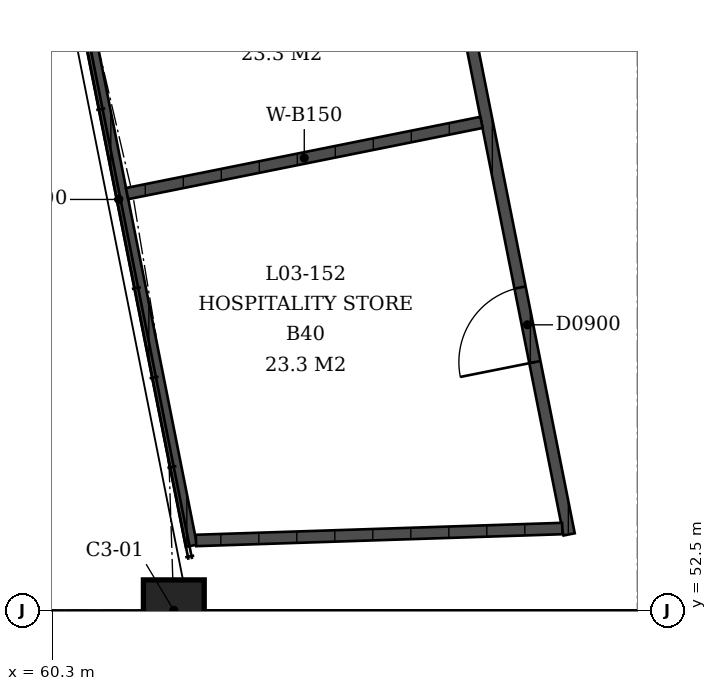
"""IFC4 building model, lengths in metres.
Left out: names, types, materials, properties, quantities, classifications, styles, units other than length and angle.
Written with IfcOpenShell. Run it as: python <this file> out.ifc"""

import sys

from ifc_helpers import new_model, si_unit, direction, frame, frame_2d, origin, origin_2d, place, context, subcontext, project, spatial, rectangle, extrude, element, fill, save


model = new_model("IFC4")
c1 = context("Model", 3, precision=1e-05, world=origin(), true_north=direction((0.0, 1.0)))
c2 = subcontext(c1, "Body", "Model", "MODEL_VIEW")
j1 = project(units=[si_unit("LENGTHUNIT", "METRE"), si_unit("PLANEANGLEUNIT", "RADIAN")], contexts=[c1])
p1 = place(None, origin())
s1 = spatial("IfcSite", under=j1, at=p1, CompositionType="ELEMENT")
p2 = place(p1, origin())
s2 = spatial("IfcBuilding", under=s1, at=p2, CompositionType="ELEMENT")
p3 = place(p2, frame((0.0, 0.0, 13.5)))
s3 = spatial("IfcBuildingStorey", under=s2, at=p3, CompositionType="ELEMENT", Elevation=13.5)
p4 = place(p3, frame((61.9, 52.5, 0.0), z_axis=(0.0, 0.0, 1.0), x_axis=(0.0, 1.0, 0.0)))
e1 = element("IfcColumn", 1, at=p4, inside=s3, PredefinedType="COLUMN", context=c2, shape_type="SweptSolid", body=[
    extrude(rectangle(XDim=0.8, YDim=0.8, at=origin_2d()), origin(), (0.0, 0.0, 1.0), 2.033),
])
p5 = place(p3, frame((60.235, 62.88, 0.0), z_axis=(0.0, 0.0, 1.0), x_axis=(0.19508210738, -0.98078691436, 0.0)))
e2 = element("IfcWall", 2, at=p5, inside=s3, PredefinedType="SOLIDWALL", context=c2, shape_type="SweptSolid", body=[
    extrude(rectangle(XDim=9.718, YDim=0.15, at=frame_2d((4.859, 0.0))), origin(), (0.0, 0.0, 1.0), 3.0),
])
p6 = place(p3, frame((64.939, 64.369, 0.0), z_axis=(0.0, 0.0, 1.0), x_axis=(0.195090821685, -0.980785181013, 0.0)))
e3 = element("IfcWall", 3, at=p6, inside=s3, PredefinedType="SOLIDWALL", context=c2, shape_type="SweptSolid", body=[
    extrude(rectangle(XDim=11.083, YDim=0.15, at=frame_2d((5.541, 0.0))), origin(), (0.0, 0.0, 1.0), 3.0),
])
p7 = place(p6, frame((2.311, 0.0, 0.0)))
e4 = element("IfcOpeningElement", 4, at=p7, cuts=e3, PredefinedType="OPENING", context=c2, shape_type="SweptSolid", body=[
    extrude(rectangle(XDim=1.0, YDim=2.1, at=frame_2d((0.5, 1.05))), frame((0.0, 0.075, 0.0), z_axis=(0.0, -1.0, 0.0), x_axis=(1.0, 0.0, 0.0)), (0.0, 0.0, 1.0), 0.15),
])
p8 = place(p6, frame((7.771, 0.0, 0.0)))
e5 = element("IfcOpeningElement", 5, at=p8, cuts=e3, PredefinedType="OPENING", context=c2, shape_type="SweptSolid", body=[
    extrude(rectangle(XDim=1.0, YDim=2.1, at=frame_2d((0.5, 1.05))), frame((0.0, 0.075, 0.0), z_axis=(0.0, -1.0, 0.0), x_axis=(1.0, 0.0, 0.0)), (0.0, 0.0, 1.0), 0.15),
])
p9 = place(p3, frame((61.284, 57.982, 0.0), z_axis=(0.0, 0.0, 1.0), x_axis=(0.980408567663, 0.196974720342, 0.0)))
e6 = element("IfcWall", 6, at=p9, inside=s3, PredefinedType="SOLIDWALL", context=c2, shape_type="SweptSolid", body=[
    extrude(rectangle(XDim=4.757, YDim=0.15, at=frame_2d((2.378, 0.0))), origin(), (0.0, 0.0, 1.0), 3.0),
])
p10 = place(p3, frame((62.192, 53.419, 0.0), z_axis=(0.0, 0.0, 1.0), x_axis=(0.999469799468, 0.032559483284, 0.0)))
e7 = element("IfcWall", 7, at=p10, inside=s3, PredefinedType="SOLIDWALL", context=c2, shape_type="SweptSolid", body=[
    extrude(rectangle(XDim=4.821, YDim=0.15, at=frame_2d((2.411, 0.0))), origin(), (0.0, 0.0, 1.0), 3.0),
])
p11 = place(p8, origin())
e8 = element("IfcDoor", 8, at=p11, inside=s3, OperationType="SINGLE_SWING_RIGHT", PredefinedType="DOOR", context=c2, shape_type="SweptSolid", body=[
    extrude(rectangle(XDim=1.0, YDim=2.1, at=frame_2d((0.5, 1.05))), frame((0.0, 0.025, 0.0), z_axis=(0.0, -1.0, 0.0), x_axis=(1.0, 0.0, 0.0)), (0.0, 0.0, 1.0), 0.05),
])
fill(e5, e8)
save(model, sys.argv[1])
